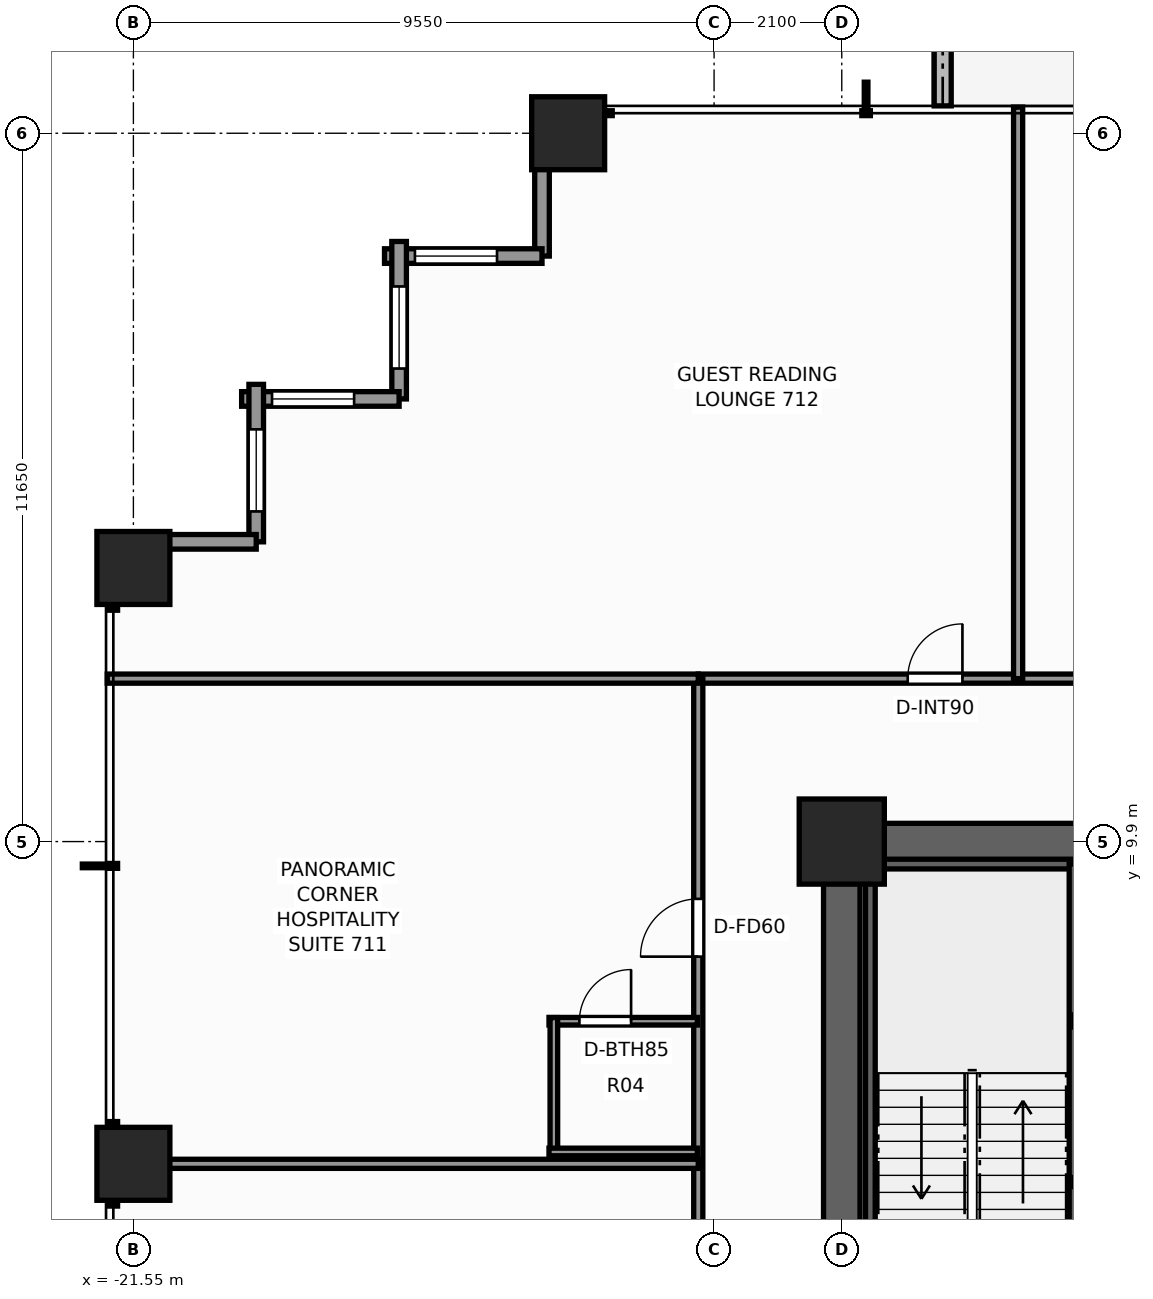
"""IFC4 building model, lengths in metres.
Left out: names, types, materials, properties, quantities, classifications, styles, units other than length and angle.
Written with IfcOpenShell. Run it as: python <this file> out.ifc"""

import sys

from ifc_helpers import new_model, si_unit, direction, frame, frame_2d, origin, origin_2d, place, context, subcontext, project, spatial, rectangle, extrude, element, fill, save


model = new_model("IFC4")
c1 = context("Model", 3, precision=1e-05, world=origin(), true_north=direction((0.0, 1.0)))
c2 = subcontext(c1, "Body", "Model", "MODEL_VIEW")
j1 = project(units=[si_unit("LENGTHUNIT", "METRE"), si_unit("PLANEANGLEUNIT", "RADIAN")], contexts=[c1])
p1 = place(None, origin())
s1 = spatial("IfcSite", under=j1, at=p1, CompositionType="ELEMENT")
p2 = place(p1, origin())
s2 = spatial("IfcBuilding", under=s1, at=p2, CompositionType="ELEMENT")
p3 = place(p2, frame((0.0, 0.0, 27.1)))
s3 = spatial("IfcBuildingStorey", under=s2, at=p3, CompositionType="ELEMENT", Elevation=27.1)
p4 = place(p3, frame((-10.2, 9.9, 0.0), z_axis=(0.0, 0.0, 1.0), x_axis=(1.0, 0.0, 0.0)))
e1 = element("IfcWall", 1, at=p4, inside=s3, PredefinedType="SHEAR", context=c2, shape_type="SweptSolid", body=[
    extrude(rectangle(XDim=14.62, YDim=0.6, at=frame_2d((7.31, 0.0))), origin(), (0.0, 0.0, 1.0), 3.3),
])
p5 = place(p3, frame((-9.9, -3.7, 0.0), z_axis=(0.0, 0.0, 1.0), x_axis=(0.0, 1.0, 0.0)))
e2 = element("IfcWall", 2, at=p5, inside=s3, PredefinedType="SHEAR", context=c2, shape_type="SweptSolid", body=[
    extrude(rectangle(XDim=13.3, YDim=0.6, at=frame_2d((6.65, 0.0))), origin(), (0.0, 0.0, 1.0), 3.3),
])
p6 = place(p5, frame((0.35, 0.0, 0.0)))
e3 = element("IfcOpeningElement", 3, at=p6, cuts=e2, PredefinedType="OPENING", context=c2, shape_type="SweptSolid", body=[
    extrude(rectangle(XDim=1.1, YDim=2.2, at=frame_2d((0.55, 1.1))), frame((0.0, 0.31, 0.0), z_axis=(0.0, -1.0, 0.0), x_axis=(1.0, 0.0, 0.0)), (0.0, 0.0, 1.0), 0.62),
])
p7 = place(p3, frame((-9.9, 9.9, 0.0), z_axis=(0.0, 0.0, 1.0), x_axis=(1.0, 0.0, 0.0)))
e4 = element("IfcColumn", 4, at=p7, inside=s3, PredefinedType="COLUMN", context=c2, shape_type="SweptSolid", body=[
    extrude(rectangle(XDim=1.4, YDim=1.4, at=origin_2d()), origin(), (0.0, 0.0, 1.0), 3.3),
])
for number, where, z_axis, x_axis in (
    (5, (-14.4, 21.55, 0.0), (0.0, 0.0, 1.0), (1.0, 0.0, 0.0)),
    (6, (-21.55, 4.6, 0.0), (0.0, 0.0, 1.0), (1.0, 0.0, 0.0)),
    (7, (-21.55, 14.4, 0.0), (0.0, 0.0, 1.0), (1.0, 0.0, 0.0)),
):
    element("IfcColumn", number, at=place(p3, frame(where, z_axis=z_axis, x_axis=x_axis)), inside=s3, PredefinedType="COLUMN", context=c2, shape_type="SweptSolid", body=[
        extrude(rectangle(XDim=1.2, YDim=1.2, at=origin_2d()), origin(), (0.0, 0.0, 1.0), 3.3),
    ])
p8 = place(p3, frame((-8.24, 25.367, -0.06), z_axis=(0.0, 0.0, 1.0), x_axis=(0.0, -1.0, 0.0)))
e8 = element("IfcWall", 8, at=p8, inside=s3, PredefinedType="PARAPET", context=c2, shape_type="SweptSolid", body=[
    extrude(rectangle(XDim=3.367, YDim=0.28, at=frame_2d((1.684, 0.0))), origin(), (0.0, 0.0, 1.0), 0.42),
])
p9 = place(p3, frame((-14.83, 19.53, 0.0), z_axis=(0.0, 0.0, 1.0), x_axis=(0.0, 1.0, 0.0)))
e9 = element("IfcWall", 9, at=p9, inside=s3, PredefinedType="STANDARD", context=c2, shape_type="SweptSolid", body=[
    extrude(rectangle(XDim=2.59, YDim=0.24, at=frame_2d((1.295, 0.0))), origin(), (0.0, 0.0, 1.0), 2.439),
])
p10 = place(p3, frame((-17.42, 19.53, 0.0), z_axis=(0.0, 0.0, 1.0), x_axis=(1.0, 0.0, 0.0)))
e10 = element("IfcWall", 10, at=p10, inside=s3, PredefinedType="STANDARD", context=c2, shape_type="SweptSolid", body=[
    extrude(rectangle(XDim=2.59, YDim=0.24, at=frame_2d((1.295, 0.0))), origin(), (0.0, 0.0, 1.0), 2.439),
])
p11 = place(p10, frame((0.5, 0.0, 0.65)))
e11 = element("IfcOpeningElement", 11, at=p11, cuts=e10, PredefinedType="OPENING", context=c2, shape_type="SweptSolid", body=[
    extrude(rectangle(XDim=1.35, YDim=1.55, at=frame_2d((0.675, 0.775))), frame((0.0, 0.13, 0.0), z_axis=(0.0, -1.0, 0.0), x_axis=(1.0, 0.0, 0.0)), (0.0, 0.0, 1.0), 0.26),
])
p12 = place(p3, frame((-17.18, 17.18, 0.0), z_axis=(0.0, 0.0, 1.0), x_axis=(0.0, 1.0, 0.0)))
e12 = element("IfcWall", 12, at=p12, inside=s3, PredefinedType="STANDARD", context=c2, shape_type="SweptSolid", body=[
    extrude(rectangle(XDim=2.59, YDim=0.24, at=frame_2d((1.295, 0.0))), origin(), (0.0, 0.0, 1.0), 2.439),
])
p13 = place(p12, frame((0.5, 0.0, 0.65)))
e13 = element("IfcOpeningElement", 13, at=p13, cuts=e12, PredefinedType="OPENING", context=c2, shape_type="SweptSolid", body=[
    extrude(rectangle(XDim=1.35, YDim=1.55, at=frame_2d((0.675, 0.775))), frame((0.0, 0.13, 0.0), z_axis=(0.0, -1.0, 0.0), x_axis=(1.0, 0.0, 0.0)), (0.0, 0.0, 1.0), 0.26),
])
p14 = place(p3, frame((-19.77, 17.18, 0.0), z_axis=(0.0, 0.0, 1.0), x_axis=(1.0, 0.0, 0.0)))
e14 = element("IfcWall", 14, at=p14, inside=s3, PredefinedType="STANDARD", context=c2, shape_type="SweptSolid", body=[
    extrude(rectangle(XDim=2.59, YDim=0.24, at=frame_2d((1.295, 0.0))), origin(), (0.0, 0.0, 1.0), 2.439),
])
p15 = place(p14, frame((0.5, 0.0, 0.65)))
e15 = element("IfcOpeningElement", 15, at=p15, cuts=e14, PredefinedType="OPENING", context=c2, shape_type="SweptSolid", body=[
    extrude(rectangle(XDim=1.35, YDim=1.55, at=frame_2d((0.675, 0.775))), frame((0.0, 0.13, 0.0), z_axis=(0.0, -1.0, 0.0), x_axis=(1.0, 0.0, 0.0)), (0.0, 0.0, 1.0), 0.26),
])
p16 = place(p3, frame((-19.53, 14.83, 0.0), z_axis=(0.0, 0.0, 1.0), x_axis=(0.0, 1.0, 0.0)))
e16 = element("IfcWall", 16, at=p16, inside=s3, PredefinedType="STANDARD", context=c2, shape_type="SweptSolid", body=[
    extrude(rectangle(XDim=2.59, YDim=0.24, at=frame_2d((1.295, 0.0))), origin(), (0.0, 0.0, 1.0), 2.439),
])
p17 = place(p16, frame((0.5, 0.0, 0.65)))
e17 = element("IfcOpeningElement", 17, at=p17, cuts=e16, PredefinedType="OPENING", context=c2, shape_type="SweptSolid", body=[
    extrude(rectangle(XDim=1.35, YDim=1.55, at=frame_2d((0.675, 0.775))), frame((0.0, 0.13, 0.0), z_axis=(0.0, -1.0, 0.0), x_axis=(1.0, 0.0, 0.0)), (0.0, 0.0, 1.0), 0.26),
])
p18 = place(p3, frame((-22.12, 14.83, 0.0), z_axis=(0.0, 0.0, 1.0), x_axis=(1.0, 0.0, 0.0)))
e18 = element("IfcWall", 18, at=p18, inside=s3, PredefinedType="STANDARD", context=c2, shape_type="SweptSolid", body=[
    extrude(rectangle(XDim=2.59, YDim=0.24, at=frame_2d((1.295, 0.0))), origin(), (0.0, 0.0, 1.0), 2.439),
])
p19 = place(p3, frame((-9.52, 9.53, 0.0), z_axis=(0.0, 0.0, 1.0), x_axis=(1.0, 0.0, 0.0)))
e19 = element("IfcWall", 19, at=p19, inside=s3, PredefinedType="SHEAR", context=c2, shape_type="SweptSolid", body=[
    extrude(rectangle(XDim=3.52, YDim=0.16, at=frame_2d((1.76, 0.0))), origin(), (0.0, 0.0, 1.0), 3.3),
])
for number, where, z_axis, x_axis in (
    (20, (-9.43, 1.97, 0.0), (0.0, 0.0, 1.0), (0.0, 1.0, 0.0)),
    (21, (-6.08, 1.97, 0.0), (0.0, 0.0, 1.0), (0.0, 1.0, 0.0)),
):
    element("IfcWall", number, at=place(p3, frame(where, z_axis=z_axis, x_axis=x_axis)), inside=s3, PredefinedType="SHEAR", context=c2, shape_type="SweptSolid", body=[
        extrude(rectangle(XDim=7.56, YDim=0.16, at=frame_2d((3.78, 0.0))), origin(), (0.0, 0.0, 1.0), 3.3),
    ])
p20 = place(p3, frame((-12.26, 12.58, 0.0), z_axis=(0.0, 0.0, 1.0), x_axis=(1.0, 0.0, 0.0)))
e22 = element("IfcWall", 22, at=p20, inside=s3, PredefinedType="PARTITIONING", context=c2, shape_type="SweptSolid", body=[
    extrude(rectangle(XDim=24.68, YDim=0.15, at=frame_2d((12.34, 0.0))), origin(), (0.0, 0.0, 1.0), 2.272),
])
p21 = place(p20, frame((3.444, 0.0, 0.0)))
e23 = element("IfcOpeningElement", 23, at=p21, cuts=e22, PredefinedType="OPENING", context=c2, shape_type="SweptSolid", body=[
    extrude(rectangle(XDim=0.9, YDim=2.06, at=frame_2d((0.45, 1.03))), frame((0.0, 0.085, 0.0), z_axis=(0.0, -1.0, 0.0), x_axis=(1.0, 0.0, 0.0)), (0.0, 0.0, 1.0), 0.17),
])
p22 = place(p20, frame((9.78, 0.0, 0.0)))
e24 = element("IfcOpeningElement", 24, at=p22, cuts=e22, PredefinedType="OPENING", context=c2, shape_type="SweptSolid", body=[
    extrude(rectangle(XDim=0.9, YDim=2.06, at=frame_2d((0.45, 1.03))), frame((0.0, 0.085, 0.0), z_axis=(0.0, -1.0, 0.0), x_axis=(1.0, 0.0, 0.0)), (0.0, 0.0, 1.0), 0.17),
])
p23 = place(p20, frame((19.345, 0.0, 0.0)))
e25 = element("IfcOpeningElement", 25, at=p23, cuts=e22, PredefinedType="OPENING", context=c2, shape_type="SweptSolid", body=[
    extrude(rectangle(XDim=0.9, YDim=2.06, at=frame_2d((0.45, 1.03))), frame((0.0, 0.085, 0.0), z_axis=(0.0, -1.0, 0.0), x_axis=(1.0, 0.0, 0.0)), (0.0, 0.0, 1.0), 0.17),
])
p24 = place(p3, frame((-12.26, -12.26, 0.0), z_axis=(0.0, 0.0, 1.0), x_axis=(0.0, 1.0, 0.0)))
e26 = element("IfcWall", 26, at=p24, inside=s3, PredefinedType="PARTITIONING", context=c2, shape_type="SweptSolid", body=[
    extrude(rectangle(XDim=24.84, YDim=0.15, at=frame_2d((12.42, 0.0))), origin(), (0.0, 0.0, 1.0), 2.272),
])
p25 = place(p24, frame((4.395, 0.0, 0.0)))
e27 = element("IfcOpeningElement", 27, at=p25, cuts=e26, PredefinedType="OPENING", context=c2, shape_type="SweptSolid", body=[
    extrude(rectangle(XDim=0.95, YDim=2.06, at=frame_2d((0.475, 1.03))), frame((0.0, 0.085, 0.0), z_axis=(0.0, -1.0, 0.0), x_axis=(1.0, 0.0, 0.0)), (0.0, 0.0, 1.0), 0.17),
])
p26 = place(p24, frame((13.815, 0.0, 0.0)))
e28 = element("IfcOpeningElement", 28, at=p26, cuts=e26, PredefinedType="OPENING", context=c2, shape_type="SweptSolid", body=[
    extrude(rectangle(XDim=0.95, YDim=2.06, at=frame_2d((0.475, 1.03))), frame((0.0, 0.085, 0.0), z_axis=(0.0, -1.0, 0.0), x_axis=(1.0, 0.0, 0.0)), (0.0, 0.0, 1.0), 0.17),
])
p27 = place(p24, frame((20.268, 0.0, 0.0)))
e29 = element("IfcOpeningElement", 29, at=p27, cuts=e26, PredefinedType="OPENING", context=c2, shape_type="SweptSolid", body=[
    extrude(rectangle(XDim=0.95, YDim=2.06, at=frame_2d((0.475, 1.03))), frame((0.0, 0.085, 0.0), z_axis=(0.0, -1.0, 0.0), x_axis=(1.0, 0.0, 0.0)), (0.0, 0.0, 1.0), 0.17),
])
for number, where, z_axis, x_axis in (
    (30, (-21.98, 12.58, 0.0), (0.0, 0.0, 1.0), (1.0, 0.0, 0.0)),
    (31, (-21.98, 4.6, 0.0), (0.0, 0.0, 1.0), (1.0, 0.0, 0.0)),
):
    element("IfcWall", number, at=place(p3, frame(where, z_axis=z_axis, x_axis=x_axis)), inside=s3, PredefinedType="PARTITIONING", context=c2, shape_type="SweptSolid", body=[
        extrude(rectangle(XDim=9.72, YDim=0.15, at=frame_2d((4.86, 0.0))), origin(), (0.0, 0.0, 1.0), 2.272),
    ])
p28 = place(p3, frame((-14.715, 6.945, 0.0), z_axis=(0.0, 0.0, 1.0), x_axis=(1.0, 0.0, 0.0)))
e32 = element("IfcWall", 32, at=p28, inside=s3, PredefinedType="PARTITIONING", context=c2, shape_type="SweptSolid", body=[
    extrude(rectangle(XDim=2.44, YDim=0.125, at=frame_2d((1.22, 0.0))), origin(), (0.0, 0.0, 1.0), 3.06),
])
p29 = place(p28, frame((0.5, 0.0, 0.0)))
e33 = element("IfcOpeningElement", 33, at=p29, cuts=e32, PredefinedType="OPENING", context=c2, shape_type="SweptSolid", body=[
    extrude(rectangle(XDim=0.85, YDim=2.03, at=frame_2d((0.425, 1.015))), frame((0.0, 0.073, 0.0), z_axis=(0.0, -1.0, 0.0), x_axis=(1.0, 0.0, 0.0)), (0.0, 0.0, 1.0), 0.145),
])
p30 = place(p3, frame((-14.635, 4.735, 0.0), z_axis=(0.0, 0.0, 1.0), x_axis=(0.0, 1.0, 0.0)))
e34 = element("IfcWall", 34, at=p30, inside=s3, PredefinedType="PARTITIONING", context=c2, shape_type="SweptSolid", body=[
    extrude(rectangle(XDim=2.27, YDim=0.125, at=frame_2d((1.135, 0.0))), origin(), (0.0, 0.0, 1.0), 2.272),
])
p31 = place(p3, frame((-14.715, 4.795, 0.0), z_axis=(0.0, 0.0, 1.0), x_axis=(1.0, 0.0, 0.0)))
e35 = element("IfcWall", 35, at=p31, inside=s3, PredefinedType="PARTITIONING", context=c2, shape_type="SweptSolid", body=[
    extrude(rectangle(XDim=2.44, YDim=0.125, at=frame_2d((1.22, 0.0))), origin(), (0.0, 0.0, 1.0), 2.272),
])
p32 = place(p3, frame((-7.0, 12.58, 0.0), z_axis=(0.0, 0.0, 1.0), x_axis=(0.0, 1.0, 0.0)))
e36 = element("IfcWall", 36, at=p32, inside=s3, PredefinedType="PARTITIONING", context=c2, shape_type="SweptSolid", body=[
    extrude(rectangle(XDim=9.4, YDim=0.15, at=frame_2d((4.7, 0.0))), origin(), (0.0, 0.0, 1.0), 2.429),
])
p33 = place(p11, origin())
e37 = element("IfcWindow", 37, at=p33, inside=s3, PartitioningType="SINGLE_PANEL", PredefinedType="WINDOW", context=c2, shape_type="SweptSolid", body=[
    extrude(rectangle(XDim=1.35, YDim=1.55, at=frame_2d((0.675, 0.775))), frame((0.0, 0.03, 0.0), z_axis=(0.0, -1.0, 0.0), x_axis=(1.0, 0.0, 0.0)), (0.0, 0.0, 1.0), 0.06),
])
fill(e11, e37)
p34 = place(p13, origin())
e38 = element("IfcWindow", 38, at=p34, inside=s3, PartitioningType="SINGLE_PANEL", PredefinedType="WINDOW", context=c2, shape_type="SweptSolid", body=[
    extrude(rectangle(XDim=1.35, YDim=1.55, at=frame_2d((0.675, 0.775))), frame((0.0, 0.03, 0.0), z_axis=(0.0, -1.0, 0.0), x_axis=(1.0, 0.0, 0.0)), (0.0, 0.0, 1.0), 0.06),
])
fill(e13, e38)
p35 = place(p15, origin())
e39 = element("IfcWindow", 39, at=p35, inside=s3, PartitioningType="SINGLE_PANEL", PredefinedType="WINDOW", context=c2, shape_type="SweptSolid", body=[
    extrude(rectangle(XDim=1.35, YDim=1.55, at=frame_2d((0.675, 0.775))), frame((0.0, 0.03, 0.0), z_axis=(0.0, -1.0, 0.0), x_axis=(1.0, 0.0, 0.0)), (0.0, 0.0, 1.0), 0.06),
])
fill(e15, e39)
p36 = place(p17, origin())
e40 = element("IfcWindow", 40, at=p36, inside=s3, PartitioningType="SINGLE_PANEL", PredefinedType="WINDOW", context=c2, shape_type="SweptSolid", body=[
    extrude(rectangle(XDim=1.35, YDim=1.55, at=frame_2d((0.675, 0.775))), frame((0.0, 0.03, 0.0), z_axis=(0.0, -1.0, 0.0), x_axis=(1.0, 0.0, 0.0)), (0.0, 0.0, 1.0), 0.06),
])
fill(e17, e40)
p37 = place(p29, origin())
e41 = element("IfcDoor", 41, at=p37, inside=s3, OperationType="SINGLE_SWING_RIGHT", PredefinedType="DOOR", context=c2, shape_type="SweptSolid", body=[
    extrude(rectangle(XDim=0.85, YDim=2.03, at=frame_2d((0.425, 1.015))), frame((0.0, 0.025, 0.0), z_axis=(0.0, -1.0, 0.0), x_axis=(1.0, 0.0, 0.0)), (0.0, 0.0, 1.0), 0.05),
])
fill(e33, e41)
p38 = place(p27, origin())
e42 = element("IfcDoor", 42, at=p38, inside=s3, OperationType="SINGLE_SWING_LEFT", PredefinedType="DOOR", context=c2, shape_type="SweptSolid", body=[
    extrude(rectangle(XDim=0.95, YDim=2.06, at=frame_2d((0.475, 1.03))), frame((0.0, 0.025, 0.0), z_axis=(0.0, -1.0, 0.0), x_axis=(1.0, 0.0, 0.0)), (0.0, 0.0, 1.0), 0.05),
])
fill(e29, e42)
p39 = place(p21, origin())
e43 = element("IfcDoor", 43, at=p39, inside=s3, OperationType="SINGLE_SWING_RIGHT", PredefinedType="DOOR", context=c2, shape_type="SweptSolid", body=[
    extrude(rectangle(XDim=0.9, YDim=2.06, at=frame_2d((0.45, 1.03))), frame((0.0, 0.025, 0.0), z_axis=(0.0, -1.0, 0.0), x_axis=(1.0, 0.0, 0.0)), (0.0, 0.0, 1.0), 0.05),
])
fill(e23, e43)
save(model, sys.argv[1])
